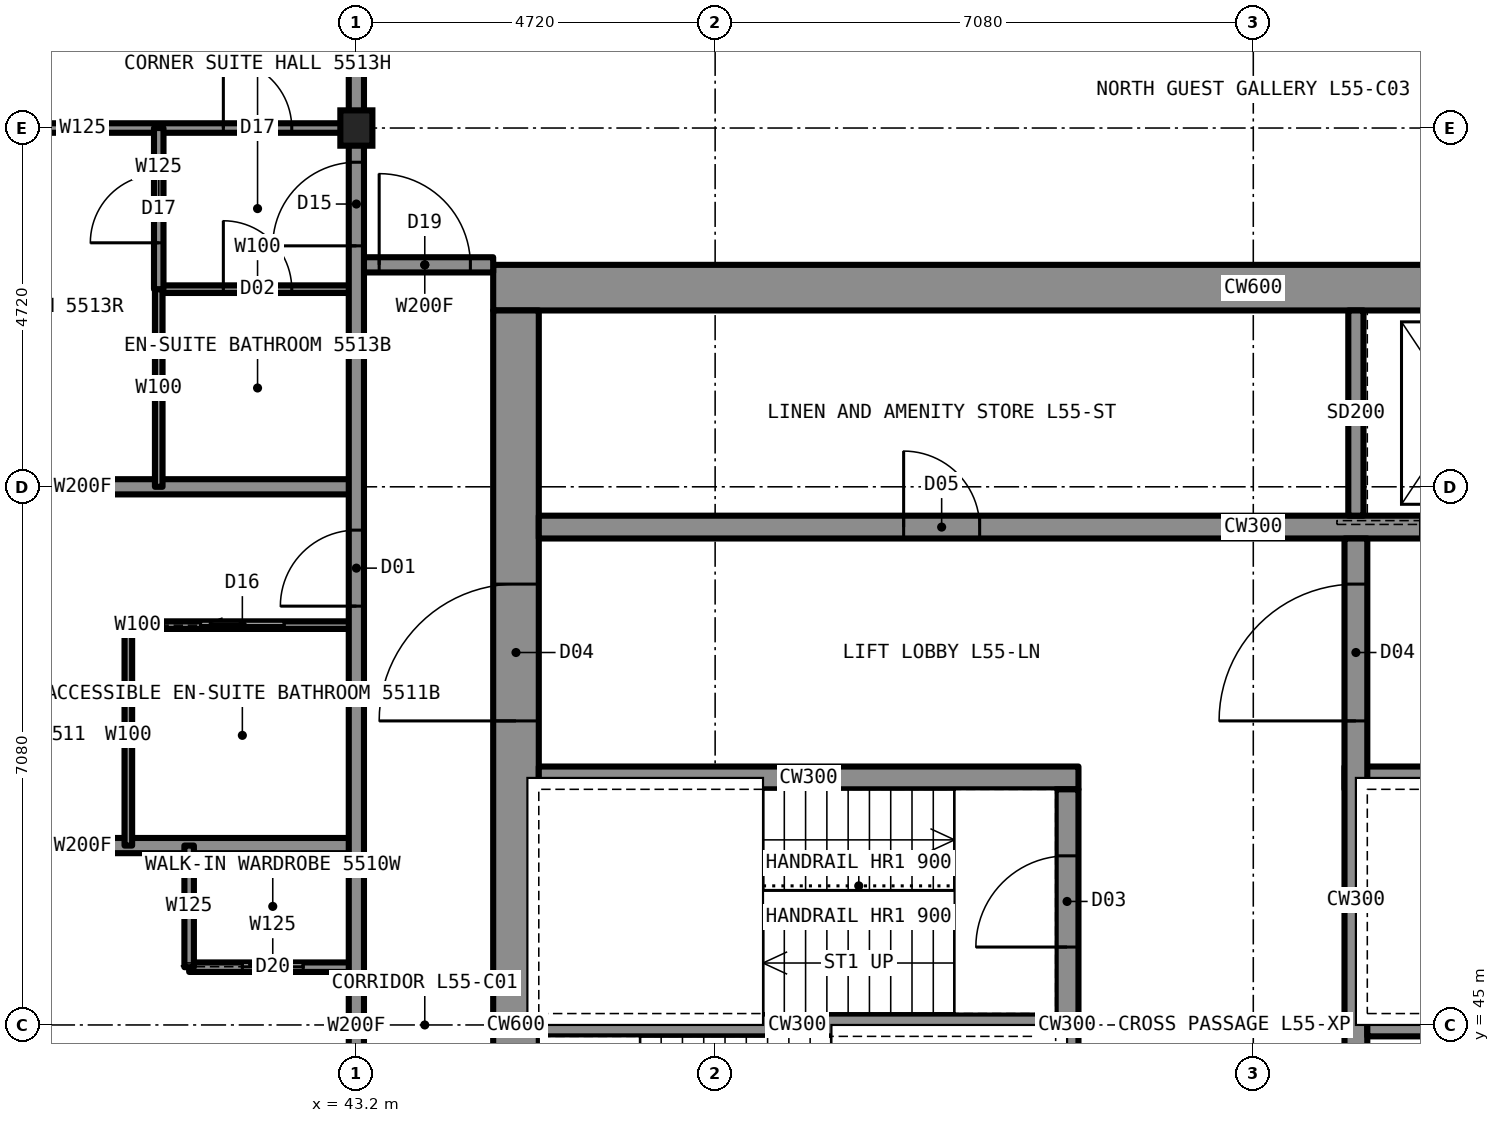
"""IFC4 building model, lengths in metres.
Left out: names, types, materials, properties, quantities, classifications, styles, units other than length and angle.
Written with IfcOpenShell. Run it as: python <this file> out.ifc"""

import sys

from ifc_helpers import new_model, si_unit, direction, frame, frame_2d, origin, origin_2d, place, context, subcontext, project, spatial, rectangle, i_section, extrude, element, fill, save


model = new_model("IFC4")
c1 = context("Model", 3, precision=1e-05, world=origin(), true_north=direction((0.0, 1.0)))
c2 = subcontext(c1, "Body", "Model", "MODEL_VIEW")
j1 = project(units=[si_unit("LENGTHUNIT", "METRE"), si_unit("PLANEANGLEUNIT", "RADIAN")], contexts=[c1])
p1 = place(None, origin())
s1 = spatial("IfcSite", under=j1, at=p1, CompositionType="ELEMENT")
p2 = place(p1, origin())
s2 = spatial("IfcBuilding", under=s1, at=p2, CompositionType="ELEMENT")
p3 = place(p2, frame((0.0, 0.0, 203.8)))
s3 = spatial("IfcBuildingStorey", under=s2, at=p3, CompositionType="ELEMENT", Elevation=203.8)
p4 = place(p3, frame((43.2, 56.8, 0.0), z_axis=(0.0, 0.0, 1.0), x_axis=(1.0, 0.0, 0.0)))
e1 = element("IfcColumn", 1, at=p4, inside=s3, PredefinedType="COLUMN", context=c2, shape_type="SweptSolid", body=[
    extrude(i_section(OverallWidth=0.422, OverallDepth=0.465, WebThickness=0.045, FlangeThickness=0.073, at=origin_2d()), origin(), (0.0, 0.0, 1.0), 3.5),
])
p5 = place(p3, frame((45.0, 54.7, 0.0), z_axis=(0.0, 0.0, 1.0), x_axis=(1.0, 0.0, 0.0)))
e2 = element("IfcWall", 2, at=p5, inside=s3, PredefinedType="SHEAR", context=c2, shape_type="SweptSolid", body=[
    extrude(rectangle(XDim=20.0, YDim=0.6, at=frame_2d((10.0, 0.0))), origin(), (0.0, 0.0, 1.0), 3.5),
])
p6 = place(p3, frame((45.3, 35.6, 0.0), z_axis=(0.0, 0.0, 1.0), x_axis=(0.0, 1.0, 0.0)))
e3 = element("IfcWall", 3, at=p6, inside=s3, PredefinedType="SHEAR", context=c2, shape_type="SweptSolid", body=[
    extrude(rectangle(XDim=18.8, YDim=0.6, at=frame_2d((9.4, 0.0))), origin(), (0.0, 0.0, 1.0), 3.5),
])
p7 = place(p6, frame((13.4, 0.0, 0.0)))
e4 = element("IfcOpeningElement", 4, at=p7, cuts=e3, PredefinedType="OPENING", context=c2, shape_type="SweptSolid", body=[
    extrude(rectangle(XDim=1.8, YDim=2.2, at=frame_2d((0.9, 1.1))), frame((0.0, 0.31, 0.0), z_axis=(0.0, -1.0, 0.0), x_axis=(1.0, 0.0, 0.0)), (0.0, 0.0, 1.0), 0.62),
])
p8 = place(p6, frame((3.6, 0.0, 0.0)))
e5 = element("IfcOpeningElement", 5, at=p8, cuts=e3, PredefinedType="OPENING", context=c2, shape_type="SweptSolid", body=[
    extrude(rectangle(XDim=1.8, YDim=2.2, at=frame_2d((0.9, 1.1))), frame((0.0, 0.31, 0.0), z_axis=(0.0, -1.0, 0.0), x_axis=(1.0, 0.0, 0.0)), (0.0, 0.0, 1.0), 0.62),
])
p9 = place(p6, frame((6.4, 0.0, 0.0)))
e6 = element("IfcOpeningElement", 6, at=p9, cuts=e3, PredefinedType="OPENING", context=c2, shape_type="SweptSolid", body=[
    extrude(rectangle(XDim=1.2, YDim=2.2, at=frame_2d((0.6, 1.1))), frame((0.0, 0.31, 0.0), z_axis=(0.0, -1.0, 0.0), x_axis=(1.0, 0.0, 0.0)), (0.0, 0.0, 1.0), 0.62),
])
p10 = place(p3, frame((45.6, 51.55, 0.0), z_axis=(0.0, 0.0, 1.0), x_axis=(1.0, 0.0, 0.0)))
e7 = element("IfcWall", 7, at=p10, inside=s3, PredefinedType="SHEAR", context=c2, shape_type="SweptSolid", body=[
    extrude(rectangle(XDim=18.8, YDim=0.3, at=frame_2d((9.4, 0.0))), origin(), (0.0, 0.0, 1.0), 3.5),
])
p11 = place(p10, frame((4.8, 0.0, 0.0)))
e8 = element("IfcOpeningElement", 8, at=p11, cuts=e7, PredefinedType="OPENING", context=c2, shape_type="SweptSolid", body=[
    extrude(rectangle(XDim=1.0, YDim=2.1, at=frame_2d((0.5, 1.05))), frame((0.0, 0.16, 0.0), z_axis=(0.0, -1.0, 0.0), x_axis=(1.0, 0.0, 0.0)), (0.0, 0.0, 1.0), 0.32),
])
p12 = place(p10, frame((11.6, 0.0, 0.0)))
e9 = element("IfcOpeningElement", 9, at=p12, cuts=e7, PredefinedType="OPENING", context=c2, shape_type="SweptSolid", body=[
    extrude(rectangle(XDim=1.1, YDim=2.2, at=frame_2d((0.55, 1.1))), frame((0.0, 0.16, 0.0), z_axis=(0.0, -1.0, 0.0), x_axis=(1.0, 0.0, 0.0)), (0.0, 0.0, 1.0), 0.32),
])
p13 = place(p10, frame((14.3, 0.0, 0.0)))
e10 = element("IfcOpeningElement", 10, at=p13, cuts=e7, PredefinedType="OPENING", context=c2, shape_type="SweptSolid", body=[
    extrude(rectangle(XDim=1.1, YDim=2.2, at=frame_2d((0.55, 1.1))), frame((0.0, 0.16, 0.0), z_axis=(0.0, -1.0, 0.0), x_axis=(1.0, 0.0, 0.0)), (0.0, 0.0, 1.0), 0.32),
])
p14 = place(p3, frame((45.6, 48.25, 0.0), z_axis=(0.0, 0.0, 1.0), x_axis=(1.0, 0.0, 0.0)))
e11 = element("IfcWall", 11, at=p14, inside=s3, PredefinedType="SHEAR", context=c2, shape_type="SweptSolid", body=[
    extrude(rectangle(XDim=7.1, YDim=0.3, at=frame_2d((3.55, 0.0))), origin(), (0.0, 0.0, 1.0), 3.5),
])
p15 = place(p3, frame((56.2, 48.25, 0.0), z_axis=(0.0, 0.0, 1.0), x_axis=(1.0, 0.0, 0.0)))
e12 = element("IfcWall", 12, at=p15, inside=s3, PredefinedType="SHEAR", context=c2, shape_type="SweptSolid", body=[
    extrude(rectangle(XDim=8.2, YDim=0.3, at=frame_2d((4.1, 0.0))), origin(), (0.0, 0.0, 1.0), 3.5),
])
p16 = place(p15, frame((6.95, 0.0, 0.0)))
e13 = element("IfcOpeningElement", 13, at=p16, cuts=e12, PredefinedType="OPENING", context=c2, shape_type="SweptSolid", body=[
    extrude(rectangle(XDim=1.2, YDim=2.2, at=frame_2d((0.6, 1.1))), frame((0.0, 0.16, 0.0), z_axis=(0.0, -1.0, 0.0), x_axis=(1.0, 0.0, 0.0)), (0.0, 0.0, 1.0), 0.32),
])
p17 = place(p3, frame((52.55, 41.9, 0.0), z_axis=(0.0, 0.0, 1.0), x_axis=(0.0, 1.0, 0.0)))
e14 = element("IfcWall", 14, at=p17, inside=s3, PredefinedType="SHEAR", context=c2, shape_type="SweptSolid", body=[
    extrude(rectangle(XDim=6.2, YDim=0.3, at=frame_2d((3.1, 0.0))), origin(), (0.0, 0.0, 1.0), 3.5),
])
p18 = place(p17, frame((4.125, 0.0, 0.0)))
e15 = element("IfcOpeningElement", 15, at=p18, cuts=e14, PredefinedType="OPENING", context=c2, shape_type="SweptSolid", body=[
    extrude(rectangle(XDim=1.2, YDim=2.2, at=frame_2d((0.6, 1.1))), frame((0.0, 0.16, 0.0), z_axis=(0.0, -1.0, 0.0), x_axis=(1.0, 0.0, 0.0)), (0.0, 0.0, 1.0), 0.32),
])
p19 = place(p3, frame((56.35, 41.9, 0.0), z_axis=(0.0, 0.0, 1.0), x_axis=(0.0, 1.0, 0.0)))
e16 = element("IfcWall", 16, at=p19, inside=s3, PredefinedType="SHEAR", context=c2, shape_type="SweptSolid", body=[
    extrude(rectangle(XDim=9.5, YDim=0.3, at=frame_2d((4.75, 0.0))), origin(), (0.0, 0.0, 1.0), 3.5),
])
p20 = place(p19, frame((7.1, 0.0, 0.0)))
e17 = element("IfcOpeningElement", 17, at=p20, cuts=e16, PredefinedType="OPENING", context=c2, shape_type="SweptSolid", body=[
    extrude(rectangle(XDim=1.8, YDim=2.2, at=frame_2d((0.9, 1.1))), frame((0.0, 0.16, 0.0), z_axis=(0.0, -1.0, 0.0), x_axis=(1.0, 0.0, 0.0)), (0.0, 0.0, 1.0), 0.32),
])
p21 = place(p3, frame((45.6, 45.0, 0.0), z_axis=(0.0, 0.0, 1.0), x_axis=(1.0, 0.0, 0.0)))
e18 = element("IfcWall", 18, at=p21, inside=s3, PredefinedType="SHEAR", context=c2, shape_type="SweptSolid", body=[
    extrude(rectangle(XDim=6.8, YDim=0.3, at=frame_2d((3.4, 0.0))), origin(), (0.0, 0.0, 1.0), 3.5),
])
p22 = place(p3, frame((56.5, 45.0, 0.0), z_axis=(0.0, 0.0, 1.0), x_axis=(1.0, 0.0, 0.0)))
e19 = element("IfcWall", 19, at=p22, inside=s3, PredefinedType="SHEAR", context=c2, shape_type="SweptSolid", body=[
    extrude(rectangle(XDim=7.9, YDim=0.3, at=frame_2d((3.95, 0.0))), origin(), (0.0, 0.0, 1.0), 3.5),
])
p23 = place(p3, frame((41.0, 45.76, 0.0), z_axis=(0.0, 0.0, 1.0), x_axis=(1.0, 0.0, 0.0)))
e20 = element("IfcWall", 20, at=p23, inside=s3, PredefinedType="PARTITIONING", context=c2, shape_type="SweptSolid", body=[
    extrude(rectangle(XDim=2.2, YDim=0.125, at=frame_2d((1.1, 0.0))), origin(), (0.0, 0.0, 1.0), 3.33),
])
p24 = place(p23, frame((0.7, 0.0, 0.0)))
e21 = element("IfcOpeningElement", 21, at=p24, cuts=e20, PredefinedType="OPENING", context=c2, shape_type="SweptSolid", body=[
    extrude(rectangle(XDim=0.8, YDim=2.1, at=frame_2d((0.4, 1.05))), frame((0.0, 0.073, 0.0), z_axis=(0.0, -1.0, 0.0), x_axis=(1.0, 0.0, 0.0)), (0.0, 0.0, 1.0), 0.145),
])
p25 = place(p3, frame((43.2, 55.0, 0.0), z_axis=(0.0, 0.0, 1.0), x_axis=(1.0, 0.0, 0.0)))
e22 = element("IfcWall", 22, at=p25, inside=s3, PredefinedType="PARTITIONING", context=c2, shape_type="SweptSolid", body=[
    extrude(rectangle(XDim=1.8, YDim=0.2, at=frame_2d((0.9, 0.0))), origin(), (0.0, 0.0, 1.0), 3.33),
])
p26 = place(p25, frame((0.3, 0.0, 0.0)))
e23 = element("IfcOpeningElement", 23, at=p26, cuts=e22, PredefinedType="OPENING", context=c2, shape_type="SweptSolid", body=[
    extrude(rectangle(XDim=1.2, YDim=2.2, at=frame_2d((0.6, 1.1))), frame((0.0, 0.11, 0.0), z_axis=(0.0, -1.0, 0.0), x_axis=(1.0, 0.0, 0.0)), (0.0, 0.0, 1.0), 0.22),
])
p27 = place(p3, frame((36.0, 56.8, 0.0), z_axis=(0.0, 0.0, 1.0), x_axis=(1.0, 0.0, 0.0)))
e24 = element("IfcWall", 24, at=p27, inside=s3, PredefinedType="PARTITIONING", context=c2, shape_type="SweptSolid", body=[
    extrude(rectangle(XDim=7.2, YDim=0.125, at=frame_2d((3.6, 0.0))), origin(), (0.0, 0.0, 1.0), 2.573),
])
p28 = place(p27, frame((5.45, 0.0, 0.0)))
e25 = element("IfcOpeningElement", 25, at=p28, cuts=e24, PredefinedType="OPENING", context=c2, shape_type="SweptSolid", body=[
    extrude(rectangle(XDim=0.9, YDim=2.2, at=frame_2d((0.45, 1.1))), frame((0.0, 0.073, 0.0), z_axis=(0.0, -1.0, 0.0), x_axis=(1.0, 0.0, 0.0)), (0.0, 0.0, 1.0), 0.145),
])
p29 = place(p3, frame((36.0, 47.36, 0.0), z_axis=(0.0, 0.0, 1.0), x_axis=(1.0, 0.0, 0.0)))
e26 = element("IfcWall", 26, at=p29, inside=s3, PredefinedType="PARTITIONING", context=c2, shape_type="SweptSolid", body=[
    extrude(rectangle(XDim=7.2, YDim=0.2, at=frame_2d((3.6, 0.0))), origin(), (0.0, 0.0, 1.0), 2.73),
])
p30 = place(p3, frame((40.2, 50.26, 0.0), z_axis=(0.0, 0.0, 1.0), x_axis=(1.0, 0.0, 0.0)))
e27 = element("IfcWall", 27, at=p30, inside=s3, PredefinedType="PARTITIONING", context=c2, shape_type="SweptSolid", body=[
    extrude(rectangle(XDim=3.0, YDim=0.1, at=frame_2d((1.5, 0.0))), origin(), (0.0, 0.0, 1.0), 3.33),
])
p31 = place(p30, frame((0.95, 0.0, 0.0)))
e28 = element("IfcOpeningElement", 28, at=p31, cuts=e27, PredefinedType="OPENING", context=c2, shape_type="SweptSolid", body=[
    extrude(rectangle(XDim=1.1, YDim=2.1, at=frame_2d((0.55, 1.05))), frame((0.0, 0.06, 0.0), z_axis=(0.0, -1.0, 0.0), x_axis=(1.0, 0.0, 0.0)), (0.0, 0.0, 1.0), 0.12),
])
p32 = place(p3, frame((36.0, 52.08, 0.0), z_axis=(0.0, 0.0, 1.0), x_axis=(1.0, 0.0, 0.0)))
e29 = element("IfcWall", 29, at=p32, inside=s3, PredefinedType="PARTITIONING", context=c2, shape_type="SweptSolid", body=[
    extrude(rectangle(XDim=7.2, YDim=0.2, at=frame_2d((3.6, 0.0))), origin(), (0.0, 0.0, 1.0), 2.573),
])
p33 = place(p3, frame((40.6, 54.68, 0.0), z_axis=(0.0, 0.0, 1.0), x_axis=(1.0, 0.0, 0.0)))
e30 = element("IfcWall", 30, at=p33, inside=s3, PredefinedType="PARTITIONING", context=c2, shape_type="SweptSolid", body=[
    extrude(rectangle(XDim=2.6, YDim=0.1, at=frame_2d((1.3, 0.0))), origin(), (0.0, 0.0, 1.0), 3.33),
])
p34 = place(p33, frame((0.85, 0.0, 0.0)))
e31 = element("IfcOpeningElement", 31, at=p34, cuts=e30, PredefinedType="OPENING", context=c2, shape_type="SweptSolid", body=[
    extrude(rectangle(XDim=0.9, YDim=2.1, at=frame_2d((0.45, 1.05))), frame((0.0, 0.06, 0.0), z_axis=(0.0, -1.0, 0.0), x_axis=(1.0, 0.0, 0.0)), (0.0, 0.0, 1.0), 0.12),
])
p35 = place(p3, frame((43.2, 33.2, 0.0), z_axis=(0.0, 0.0, 1.0), x_axis=(0.0, 1.0, 0.0)))
e32 = element("IfcWall", 32, at=p35, inside=s3, PredefinedType="PARTITIONING", context=c2, shape_type="SweptSolid", body=[
    extrude(rectangle(XDim=23.58, YDim=0.2, at=frame_2d((11.79, 0.0))), origin(), (0.0, 0.0, 1.0), 3.33),
])
p36 = place(p35, frame((7.72, 0.0, 0.0)))
e33 = element("IfcOpeningElement", 33, at=p36, cuts=e32, PredefinedType="OPENING", context=c2, shape_type="SweptSolid", body=[
    extrude(rectangle(XDim=1.0, YDim=2.2, at=frame_2d((0.5, 1.1))), frame((0.0, 0.11, 0.0), z_axis=(0.0, -1.0, 0.0), x_axis=(1.0, 0.0, 0.0)), (0.0, 0.0, 1.0), 0.22),
])
p37 = place(p35, frame((17.31, 0.0, 0.0)))
e34 = element("IfcOpeningElement", 34, at=p37, cuts=e32, PredefinedType="OPENING", context=c2, shape_type="SweptSolid", body=[
    extrude(rectangle(XDim=1.0, YDim=2.2, at=frame_2d((0.5, 1.1))), frame((0.0, 0.11, 0.0), z_axis=(0.0, -1.0, 0.0), x_axis=(1.0, 0.0, 0.0)), (0.0, 0.0, 1.0), 0.22),
])
p38 = place(p35, frame((22.05, 0.0, 0.0)))
e35 = element("IfcOpeningElement", 35, at=p38, cuts=e32, PredefinedType="OPENING", context=c2, shape_type="SweptSolid", body=[
    extrude(rectangle(XDim=1.1, YDim=2.2, at=frame_2d((0.55, 1.1))), frame((0.0, 0.11, 0.0), z_axis=(0.0, -1.0, 0.0), x_axis=(1.0, 0.0, 0.0)), (0.0, 0.0, 1.0), 0.22),
])
p39 = place(p35, frame((0.66, 0.0, 0.0)))
e36 = element("IfcOpeningElement", 36, at=p39, cuts=e32, PredefinedType="OPENING", context=c2, shape_type="SweptSolid", body=[
    extrude(rectangle(XDim=1.1, YDim=2.2, at=frame_2d((0.55, 1.1))), frame((0.0, 0.11, 0.0), z_axis=(0.0, -1.0, 0.0), x_axis=(1.0, 0.0, 0.0)), (0.0, 0.0, 1.0), 0.22),
])
p40 = place(p3, frame((41.0, 45.76, 0.0), z_axis=(0.0, 0.0, 1.0), x_axis=(0.0, 1.0, 0.0)))
e37 = element("IfcWall", 37, at=p40, inside=s3, PredefinedType="PARTITIONING", context=c2, shape_type="SweptSolid", body=[
    extrude(rectangle(XDim=1.6, YDim=0.125, at=frame_2d((0.8, 0.0))), origin(), (0.0, 0.0, 1.0), 3.33),
])
p41 = place(p3, frame((40.6, 52.08, 0.0), z_axis=(0.0, 0.0, 1.0), x_axis=(0.0, 1.0, 0.0)))
e38 = element("IfcWall", 38, at=p41, inside=s3, PredefinedType="PARTITIONING", context=c2, shape_type="SweptSolid", body=[
    extrude(rectangle(XDim=2.6, YDim=0.1, at=frame_2d((1.3, 0.0))), origin(), (0.0, 0.0, 1.0), 3.33),
])
p42 = place(p3, frame((40.6, 54.68, 0.0), z_axis=(0.0, 0.0, 1.0), x_axis=(0.0, 1.0, 0.0)))
e39 = element("IfcWall", 39, at=p42, inside=s3, PredefinedType="PARTITIONING", context=c2, shape_type="SweptSolid", body=[
    extrude(rectangle(XDim=2.12, YDim=0.125, at=frame_2d((1.06, 0.0))), origin(), (0.0, 0.0, 1.0), 3.33),
])
p43 = place(p42, frame((0.61, 0.0, 0.0)))
e40 = element("IfcOpeningElement", 40, at=p43, cuts=e39, PredefinedType="OPENING", context=c2, shape_type="SweptSolid", body=[
    extrude(rectangle(XDim=0.9, YDim=2.2, at=frame_2d((0.45, 1.1))), frame((0.0, 0.073, 0.0), z_axis=(0.0, -1.0, 0.0), x_axis=(1.0, 0.0, 0.0)), (0.0, 0.0, 1.0), 0.145),
])
p44 = place(p3, frame((40.2, 47.36, 0.0), z_axis=(0.0, 0.0, 1.0), x_axis=(0.0, 1.0, 0.0)))
e41 = element("IfcWall", 41, at=p44, inside=s3, PredefinedType="PARTITIONING", context=c2, shape_type="SweptSolid", body=[
    extrude(rectangle(XDim=2.9, YDim=0.1, at=frame_2d((1.45, 0.0))), origin(), (0.0, 0.0, 1.0), 3.33),
])
p45 = place(p3, frame((56.35, 51.7, 0.0), z_axis=(0.0, 0.0, 1.0), x_axis=(0.0, 1.0, 0.0)))
e42 = element("IfcWall", 42, at=p45, inside=s3, PredefinedType="PARTITIONING", context=c2, shape_type="SweptSolid", body=[
    extrude(rectangle(XDim=2.7, YDim=0.2, at=frame_2d((1.35, 0.0))), origin(), (0.0, 0.0, 1.0), 3.33),
])
p46 = place(p3, frame((43.2, 56.78, 0.0), z_axis=(0.0, 0.0, 1.0), x_axis=(0.0, 1.0, 0.0)))
e43 = element("IfcWall", 43, at=p46, inside=s3, PredefinedType="PARTITIONING", context=c2, shape_type="SweptSolid", body=[
    extrude(rectangle(XDim=2.82, YDim=0.2, at=frame_2d((1.41, 0.0))), origin(), (0.0, 0.0, 1.0), 2.573),
])
p47 = place(p26, origin())
e44 = element("IfcDoor", 44, at=p47, inside=s3, OperationType="SINGLE_SWING_LEFT", PredefinedType="DOOR", context=c2, shape_type="SweptSolid", body=[
    extrude(rectangle(XDim=1.2, YDim=2.2, at=frame_2d((0.6, 1.1))), frame((0.0, 0.025, 0.0), z_axis=(0.0, -1.0, 0.0), x_axis=(1.0, 0.0, 0.0)), (0.0, 0.0, 1.0), 0.05),
])
fill(e23, e44)
p48 = place(p24, origin())
e45 = element("IfcDoor", 45, at=p48, inside=s3, OperationType="SLIDING_TO_LEFT", PredefinedType="DOOR", context=c2, shape_type="SweptSolid", body=[
    extrude(rectangle(XDim=0.8, YDim=2.1, at=frame_2d((0.4, 1.05))), frame((0.0, 0.025, 0.0), z_axis=(0.0, -1.0, 0.0), x_axis=(1.0, 0.0, 0.0)), (0.0, 0.0, 1.0), 0.05),
])
fill(e21, e45)
p49 = place(p37, origin())
e46 = element("IfcDoor", 46, at=p49, inside=s3, OperationType="SINGLE_SWING_LEFT", PredefinedType="DOOR", context=c2, shape_type="SweptSolid", body=[
    extrude(rectangle(XDim=1.0, YDim=2.2, at=frame_2d((0.5, 1.1))), frame((0.0, 0.025, 0.0), z_axis=(0.0, -1.0, 0.0), x_axis=(1.0, 0.0, 0.0)), (0.0, 0.0, 1.0), 0.05),
])
fill(e34, e46)
p50 = place(p31, origin())
e47 = element("IfcDoor", 47, at=p50, inside=s3, OperationType="SLIDING_TO_LEFT", PredefinedType="DOOR", context=c2, shape_type="SweptSolid", body=[
    extrude(rectangle(XDim=1.1, YDim=2.1, at=frame_2d((0.55, 1.05))), frame((0.0, 0.025, 0.0), z_axis=(0.0, -1.0, 0.0), x_axis=(1.0, 0.0, 0.0)), (0.0, 0.0, 1.0), 0.05),
])
fill(e28, e47)
p51 = place(p28, origin())
e48 = element("IfcDoor", 48, at=p51, inside=s3, OperationType="SINGLE_SWING_LEFT", PredefinedType="DOOR", context=c2, shape_type="SweptSolid", body=[
    extrude(rectangle(XDim=0.9, YDim=2.2, at=frame_2d((0.45, 1.1))), frame((0.0, 0.025, 0.0), z_axis=(0.0, -1.0, 0.0), x_axis=(1.0, 0.0, 0.0)), (0.0, 0.0, 1.0), 0.05),
])
fill(e25, e48)
p52 = place(p34, origin())
e49 = element("IfcDoor", 49, at=p52, inside=s3, OperationType="SINGLE_SWING_RIGHT", PredefinedType="DOOR", context=c2, shape_type="SweptSolid", body=[
    extrude(rectangle(XDim=0.9, YDim=2.1, at=frame_2d((0.45, 1.05))), frame((0.0, 0.025, 0.0), z_axis=(0.0, -1.0, 0.0), x_axis=(1.0, 0.0, 0.0)), (0.0, 0.0, 1.0), 0.05),
])
fill(e31, e49)
p53 = place(p38, origin())
e50 = element("IfcDoor", 50, at=p53, inside=s3, OperationType="SINGLE_SWING_LEFT", PredefinedType="DOOR", context=c2, shape_type="SweptSolid", body=[
    extrude(rectangle(XDim=1.1, YDim=2.2, at=frame_2d((0.55, 1.1))), frame((0.0, 0.025, 0.0), z_axis=(0.0, -1.0, 0.0), x_axis=(1.0, 0.0, 0.0)), (0.0, 0.0, 1.0), 0.05),
])
fill(e35, e50)
p54 = place(p43, origin())
e51 = element("IfcDoor", 51, at=p54, inside=s3, OperationType="SINGLE_SWING_LEFT", PredefinedType="DOOR", context=c2, shape_type="SweptSolid", body=[
    extrude(rectangle(XDim=0.9, YDim=2.2, at=frame_2d((0.45, 1.1))), frame((0.0, 0.025, 0.0), z_axis=(0.0, -1.0, 0.0), x_axis=(1.0, 0.0, 0.0)), (0.0, 0.0, 1.0), 0.05),
])
fill(e40, e51)
p55 = place(p7, origin())
e52 = element("IfcDoor", 52, at=p55, inside=s3, OperationType="DOUBLE_DOOR_SINGLE_SWING", PredefinedType="DOOR", context=c2, shape_type="SweptSolid", body=[
    extrude(rectangle(XDim=1.8, YDim=2.2, at=frame_2d((0.9, 1.1))), frame((0.0, 0.025, 0.0), z_axis=(0.0, -1.0, 0.0), x_axis=(1.0, 0.0, 0.0)), (0.0, 0.0, 1.0), 0.05),
])
fill(e4, e52)
p56 = place(p20, origin())
e53 = element("IfcDoor", 53, at=p56, inside=s3, OperationType="DOUBLE_DOOR_SINGLE_SWING", PredefinedType="DOOR", context=c2, shape_type="SweptSolid", body=[
    extrude(rectangle(XDim=1.8, YDim=2.2, at=frame_2d((0.9, 1.1))), frame((0.0, 0.025, 0.0), z_axis=(0.0, -1.0, 0.0), x_axis=(1.0, 0.0, 0.0)), (0.0, 0.0, 1.0), 0.05),
])
fill(e17, e53)
p57 = place(p18, origin())
e54 = element("IfcDoor", 54, at=p57, inside=s3, OperationType="SINGLE_SWING_LEFT", PredefinedType="DOOR", context=c2, shape_type="SweptSolid", body=[
    extrude(rectangle(XDim=1.2, YDim=2.2, at=frame_2d((0.6, 1.1))), frame((0.0, 0.025, 0.0), z_axis=(0.0, -1.0, 0.0), x_axis=(1.0, 0.0, 0.0)), (0.0, 0.0, 1.0), 0.05),
])
fill(e15, e54)
p58 = place(p11, origin())
e55 = element("IfcDoor", 55, at=p58, inside=s3, OperationType="SINGLE_SWING_LEFT", PredefinedType="DOOR", context=c2, shape_type="SweptSolid", body=[
    extrude(rectangle(XDim=1.0, YDim=2.1, at=frame_2d((0.5, 1.05))), frame((0.0, 0.025, 0.0), z_axis=(0.0, -1.0, 0.0), x_axis=(1.0, 0.0, 0.0)), (0.0, 0.0, 1.0), 0.05),
])
fill(e8, e55)
save(model, sys.argv[1])
